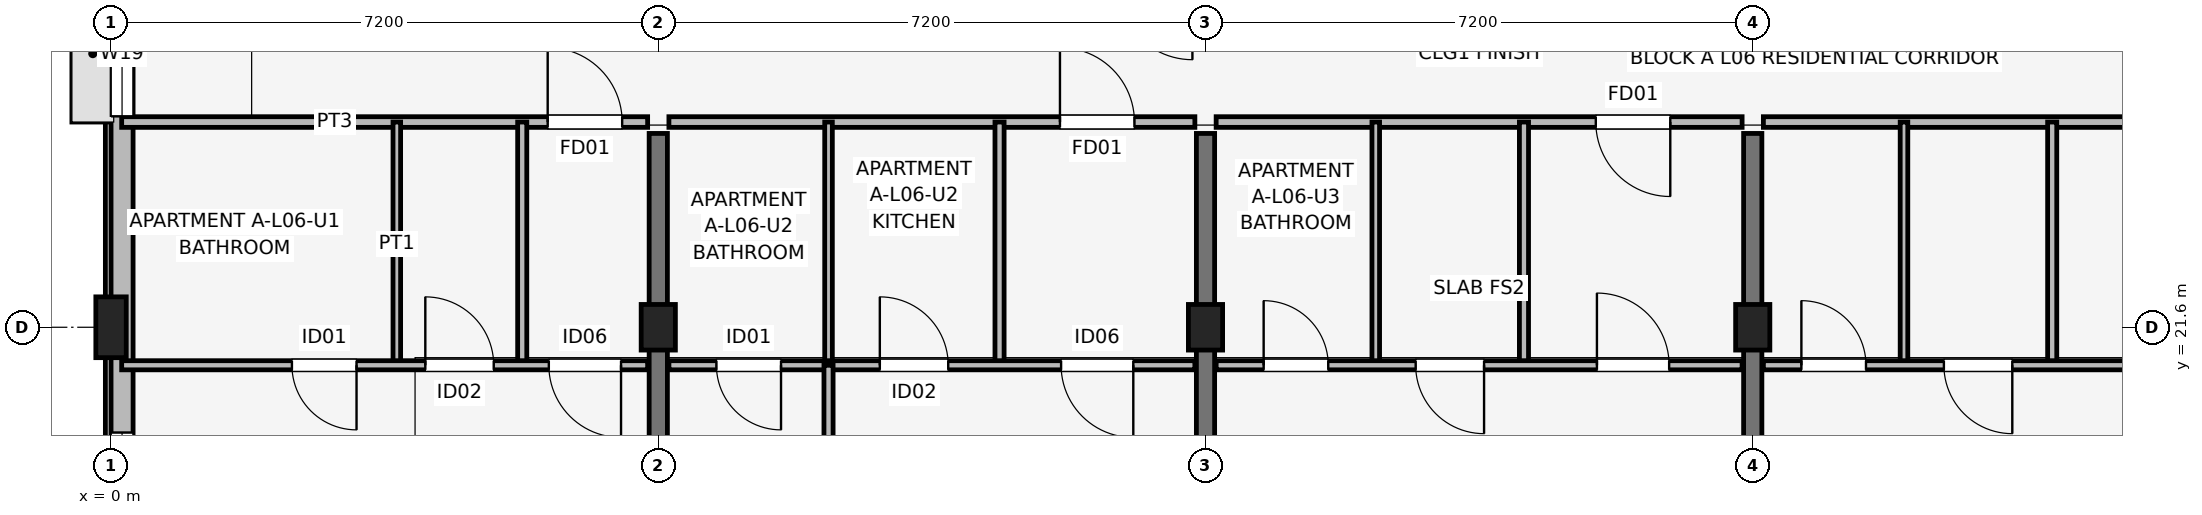
"""IFC4 building model, lengths in metres.
Left out: names, types, materials, properties, quantities, classifications, styles, units other than length and angle.
Written with IfcOpenShell. Run it as: python <this file> out.ifc"""

import sys

from ifc_helpers import new_model, si_unit, direction, frame, frame_2d, origin, origin_2d, place, context, subcontext, project, spatial, rectangle, extrude, element, fill, save


model = new_model("IFC4")
c1 = context("Model", 3, precision=1e-05, world=origin(), true_north=direction((0.0, 1.0)))
c2 = subcontext(c1, "Body", "Model", "MODEL_VIEW")
j1 = project(units=[si_unit("LENGTHUNIT", "METRE"), si_unit("PLANEANGLEUNIT", "RADIAN")], contexts=[c1])
p1 = place(None, origin())
s1 = spatial("IfcSite", under=j1, at=p1, CompositionType="ELEMENT")
p2 = place(p1, origin())
s2 = spatial("IfcBuilding", under=s1, at=p2, CompositionType="ELEMENT")
p3 = place(p2, frame((0.0, 0.0, 21.3)))
s3 = spatial("IfcBuildingStorey", under=s2, at=p3, CompositionType="ELEMENT", Elevation=21.3)
p4 = place(p3, frame((0.0, 21.6, 0.0), z_axis=(0.0, 0.0, 1.0), x_axis=(1.0, 0.0, 0.0)))
e1 = element("IfcColumn", 1, at=p4, inside=s3, PredefinedType="COLUMN", context=c2, shape_type="SweptSolid", body=[
    extrude(rectangle(XDim=0.4, YDim=0.8, at=origin_2d()), origin(), (0.0, 0.0, 1.0), 3.15),
])
for number, where, z_axis, x_axis in (
    (2, (7.2, 21.6, 0.0), (0.0, 0.0, 1.0), (1.0, 0.0, 0.0)),
    (3, (14.4, 21.6, 0.0), (0.0, 0.0, 1.0), (1.0, 0.0, 0.0)),
    (4, (21.6, 21.6, 0.0), (0.0, 0.0, 1.0), (1.0, 0.0, 0.0)),
):
    element("IfcColumn", number, at=place(p3, frame(where, z_axis=z_axis, x_axis=x_axis)), inside=s3, PredefinedType="COLUMN", context=c2, shape_type="SweptSolid", body=[
        extrude(rectangle(XDim=0.45, YDim=0.6, at=origin_2d()), origin(), (0.0, 0.0, 1.0), 3.15),
    ])
for number, where, z_axis, x_axis in (
    (5, (7.2, 14.75, 0.0), (0.0, 0.0, 1.0), (0.0, 1.0, 0.0)),
    (6, (14.4, 14.75, 0.0), (0.0, 0.0, 1.0), (0.0, 1.0, 0.0)),
    (7, (21.6, 14.75, 0.0), (0.0, 0.0, 1.0), (0.0, 1.0, 0.0)),
):
    element("IfcWall", number, at=place(p3, frame(where, z_axis=z_axis, x_axis=x_axis)), inside=s3, PredefinedType="SHEAR", context=c2, shape_type="SweptSolid", body=[
        extrude(rectangle(XDim=9.4, YDim=0.24, at=frame_2d((4.7, 0.0))), origin(), (0.0, 0.0, 1.0), 3.15),
    ])
p5 = place(p3, frame((0.145, 32.6, 0.0), z_axis=(0.0, 0.0, 1.0), x_axis=(0.0, -1.0, 0.0)))
e8 = element("IfcWall", 8, at=p5, inside=s3, PredefinedType="SOLIDWALL", context=c2, shape_type="SweptSolid", body=[
    extrude(rectangle(XDim=14.8, YDim=0.29, at=frame_2d((7.4, 0.0))), origin(), (0.0, 0.0, 1.0), 2.43),
])
p6 = place(p5, frame((6.575, 0.0, 1.05)))
e9 = element("IfcOpeningElement", 9, at=p6, cuts=e8, PredefinedType="OPENING", context=c2, shape_type="SweptSolid", body=[
    extrude(rectangle(XDim=1.65, YDim=1.15, at=frame_2d((0.825, 0.575))), frame((0.0, 0.155, 0.0), z_axis=(0.0, -1.0, 0.0), x_axis=(1.0, 0.0, 0.0)), (0.0, 0.0, 1.0), 0.31),
])
p7 = place(p5, frame((12.385, 0.0, 0.75)))
e10 = element("IfcOpeningElement", 10, at=p7, cuts=e8, PredefinedType="OPENING", context=c2, shape_type="SweptSolid", body=[
    extrude(rectangle(XDim=1.3, YDim=1.55, at=frame_2d((0.65, 0.775))), frame((0.0, 0.155, 0.0), z_axis=(0.0, -1.0, 0.0), x_axis=(1.0, 0.0, 0.0)), (0.0, 0.0, 1.0), 0.31),
])
p8 = place(p3, frame((0.14, 24.3, 0.0), z_axis=(0.0, 0.0, 1.0), x_axis=(1.0, 0.0, 0.0)))
e11 = element("IfcWall", 11, at=p8, inside=s3, PredefinedType="PARTITIONING", context=c2, shape_type="SweptSolid", body=[
    extrude(rectangle(XDim=6.92, YDim=0.14, at=frame_2d((3.46, 0.0))), origin(), (0.0, 0.0, 1.0), 2.38),
])
p9 = place(p8, frame((5.605, 0.0, 0.0)))
e12 = element("IfcOpeningElement", 12, at=p9, cuts=e11, PredefinedType="OPENING", context=c2, shape_type="SweptSolid", body=[
    extrude(rectangle(XDim=0.98, YDim=2.1, at=frame_2d((0.49, 1.05))), frame((0.0, 0.08, 0.0), z_axis=(0.0, -1.0, 0.0), x_axis=(1.0, 0.0, 0.0)), (0.0, 0.0, 1.0), 0.16),
])
p10 = place(p3, frame((3.76, 21.1, 0.0), z_axis=(0.0, 0.0, 1.0), x_axis=(0.0, 1.0, 0.0)))
e13 = element("IfcWall", 13, at=p10, inside=s3, PredefinedType="PARTITIONING", context=c2, shape_type="SweptSolid", body=[
    extrude(rectangle(XDim=3.2, YDim=0.1, at=frame_2d((1.6, 0.0))), origin(), (0.0, 0.0, 1.0), 2.38),
])
p11 = place(p3, frame((5.41, 21.1, 0.0), z_axis=(0.0, 0.0, 1.0), x_axis=(0.0, 1.0, 0.0)))
e14 = element("IfcWall", 14, at=p11, inside=s3, PredefinedType="PARTITIONING", context=c2, shape_type="SweptSolid", body=[
    extrude(rectangle(XDim=3.2, YDim=0.12, at=frame_2d((1.6, 0.0))), origin(), (0.0, 0.0, 1.0), 2.38),
])
p12 = place(p3, frame((0.14, 21.1, 0.0), z_axis=(0.0, 0.0, 1.0), x_axis=(1.0, 0.0, 0.0)))
e15 = element("IfcWall", 15, at=p12, inside=s3, PredefinedType="PARTITIONING", context=c2, shape_type="SweptSolid", body=[
    extrude(rectangle(XDim=6.92, YDim=0.12, at=frame_2d((3.46, 0.0))), origin(), (0.0, 0.0, 1.0), 2.38),
])
p13 = place(p12, frame((3.09, 0.0, 0.0), z_axis=(0.0, 0.0, 1.0), x_axis=(-1.0, 0.0, 0.0)))
e16 = element("IfcOpeningElement", 16, at=p13, cuts=e15, PredefinedType="OPENING", context=c2, shape_type="SweptSolid", body=[
    extrude(rectangle(XDim=0.85, YDim=2.08, at=frame_2d((0.425, 1.04))), frame((0.0, 0.07, 0.0), z_axis=(0.0, -1.0, 0.0), x_axis=(1.0, 0.0, 0.0)), (0.0, 0.0, 1.0), 0.14),
])
p14 = place(p12, frame((3.995, 0.0, 0.0)))
e17 = element("IfcOpeningElement", 17, at=p14, cuts=e15, PredefinedType="OPENING", context=c2, shape_type="SweptSolid", body=[
    extrude(rectangle(XDim=0.9, YDim=2.08, at=frame_2d((0.45, 1.04))), frame((0.0, 0.07, 0.0), z_axis=(0.0, -1.0, 0.0), x_axis=(1.0, 0.0, 0.0)), (0.0, 0.0, 1.0), 0.14),
])
p15 = place(p12, frame((6.57, 0.0, 0.0), z_axis=(0.0, 0.0, 1.0), x_axis=(-1.0, 0.0, 0.0)))
e18 = element("IfcOpeningElement", 18, at=p15, cuts=e15, PredefinedType="OPENING", context=c2, shape_type="SweptSolid", body=[
    extrude(rectangle(XDim=0.95, YDim=2.08, at=frame_2d((0.475, 1.04))), frame((0.0, 0.07, 0.0), z_axis=(0.0, -1.0, 0.0), x_axis=(1.0, 0.0, 0.0)), (0.0, 0.0, 1.0), 0.14),
])
p16 = place(p3, frame((7.34, 24.3, 0.0), z_axis=(0.0, 0.0, 1.0), x_axis=(1.0, 0.0, 0.0)))
e19 = element("IfcWall", 19, at=p16, inside=s3, PredefinedType="PARTITIONING", context=c2, shape_type="SweptSolid", body=[
    extrude(rectangle(XDim=6.92, YDim=0.14, at=frame_2d((3.46, 0.0))), origin(), (0.0, 0.0, 1.0), 2.38),
])
p17 = place(p16, frame((5.145, 0.0, 0.0)))
e20 = element("IfcOpeningElement", 20, at=p17, cuts=e19, PredefinedType="OPENING", context=c2, shape_type="SweptSolid", body=[
    extrude(rectangle(XDim=0.98, YDim=2.1, at=frame_2d((0.49, 1.05))), frame((0.0, 0.08, 0.0), z_axis=(0.0, -1.0, 0.0), x_axis=(1.0, 0.0, 0.0)), (0.0, 0.0, 1.0), 0.16),
])
p18 = place(p3, frame((9.44, 21.1, 0.0), z_axis=(0.0, 0.0, 1.0), x_axis=(0.0, 1.0, 0.0)))
e21 = element("IfcWall", 21, at=p18, inside=s3, PredefinedType="PARTITIONING", context=c2, shape_type="SweptSolid", body=[
    extrude(rectangle(XDim=3.2, YDim=0.1, at=frame_2d((1.6, 0.0))), origin(), (0.0, 0.0, 1.0), 2.38),
])
p19 = place(p3, frame((11.69, 21.1, 0.0), z_axis=(0.0, 0.0, 1.0), x_axis=(0.0, 1.0, 0.0)))
e22 = element("IfcWall", 22, at=p19, inside=s3, PredefinedType="PARTITIONING", context=c2, shape_type="SweptSolid", body=[
    extrude(rectangle(XDim=3.2, YDim=0.12, at=frame_2d((1.6, 0.0))), origin(), (0.0, 0.0, 1.0), 2.38),
])
p20 = place(p3, frame((7.34, 21.1, 0.0), z_axis=(0.0, 0.0, 1.0), x_axis=(1.0, 0.0, 0.0)))
e23 = element("IfcWall", 23, at=p20, inside=s3, PredefinedType="PARTITIONING", context=c2, shape_type="SweptSolid", body=[
    extrude(rectangle(XDim=6.92, YDim=0.12, at=frame_2d((3.46, 0.0))), origin(), (0.0, 0.0, 1.0), 2.38),
])
p21 = place(p20, frame((1.475, 0.0, 0.0), z_axis=(0.0, 0.0, 1.0), x_axis=(-1.0, 0.0, 0.0)))
e24 = element("IfcOpeningElement", 24, at=p21, cuts=e23, PredefinedType="OPENING", context=c2, shape_type="SweptSolid", body=[
    extrude(rectangle(XDim=0.85, YDim=2.08, at=frame_2d((0.425, 1.04))), frame((0.0, 0.07, 0.0), z_axis=(0.0, -1.0, 0.0), x_axis=(1.0, 0.0, 0.0)), (0.0, 0.0, 1.0), 0.14),
])
p22 = place(p20, frame((2.775, 0.0, 0.0)))
e25 = element("IfcOpeningElement", 25, at=p22, cuts=e23, PredefinedType="OPENING", context=c2, shape_type="SweptSolid", body=[
    extrude(rectangle(XDim=0.9, YDim=2.08, at=frame_2d((0.45, 1.04))), frame((0.0, 0.07, 0.0), z_axis=(0.0, -1.0, 0.0), x_axis=(1.0, 0.0, 0.0)), (0.0, 0.0, 1.0), 0.14),
])
p23 = place(p20, frame((6.11, 0.0, 0.0), z_axis=(0.0, 0.0, 1.0), x_axis=(-1.0, 0.0, 0.0)))
e26 = element("IfcOpeningElement", 26, at=p23, cuts=e23, PredefinedType="OPENING", context=c2, shape_type="SweptSolid", body=[
    extrude(rectangle(XDim=0.95, YDim=2.08, at=frame_2d((0.475, 1.04))), frame((0.0, 0.07, 0.0), z_axis=(0.0, -1.0, 0.0), x_axis=(1.0, 0.0, 0.0)), (0.0, 0.0, 1.0), 0.14),
])
p24 = place(p3, frame((9.44, 14.7, 0.0), z_axis=(0.0, 0.0, 1.0), x_axis=(0.0, 1.0, 0.0)))
e27 = element("IfcWall", 27, at=p24, inside=s3, PredefinedType="PARTITIONING", context=c2, shape_type="SweptSolid", body=[
    extrude(rectangle(XDim=6.4, YDim=0.12, at=frame_2d((3.2, 0.0))), origin(), (0.0, 0.0, 1.0), 2.38),
])
p25 = place(p24, frame((2.75, 0.0, 0.0)))
e28 = element("IfcOpeningElement", 28, at=p25, cuts=e27, PredefinedType="OPENING", context=c2, shape_type="SweptSolid", body=[
    extrude(rectangle(XDim=0.9, YDim=2.08, at=frame_2d((0.45, 1.04))), frame((0.0, 0.07, 0.0), z_axis=(0.0, -1.0, 0.0), x_axis=(1.0, 0.0, 0.0)), (0.0, 0.0, 1.0), 0.14),
])
p26 = place(p3, frame((14.54, 24.3, 0.0), z_axis=(0.0, 0.0, 1.0), x_axis=(1.0, 0.0, 0.0)))
e29 = element("IfcWall", 29, at=p26, inside=s3, PredefinedType="PARTITIONING", context=c2, shape_type="SweptSolid", body=[
    extrude(rectangle(XDim=6.92, YDim=0.14, at=frame_2d((3.46, 0.0))), origin(), (0.0, 0.0, 1.0), 2.38),
])
p27 = place(p26, frame((5.975, 0.0, 0.0), z_axis=(0.0, 0.0, 1.0), x_axis=(-1.0, 0.0, 0.0)))
e30 = element("IfcOpeningElement", 30, at=p27, cuts=e29, PredefinedType="OPENING", context=c2, shape_type="SweptSolid", body=[
    extrude(rectangle(XDim=0.98, YDim=2.1, at=frame_2d((0.49, 1.05))), frame((0.0, 0.08, 0.0), z_axis=(0.0, -1.0, 0.0), x_axis=(1.0, 0.0, 0.0)), (0.0, 0.0, 1.0), 0.16),
])
p28 = place(p3, frame((16.64, 21.1, 0.0), z_axis=(0.0, 0.0, 1.0), x_axis=(0.0, 1.0, 0.0)))
e31 = element("IfcWall", 31, at=p28, inside=s3, PredefinedType="PARTITIONING", context=c2, shape_type="SweptSolid", body=[
    extrude(rectangle(XDim=3.2, YDim=0.1, at=frame_2d((1.6, 0.0))), origin(), (0.0, 0.0, 1.0), 2.38),
])
p29 = place(p3, frame((18.59, 21.1, 0.0), z_axis=(0.0, 0.0, 1.0), x_axis=(0.0, 1.0, 0.0)))
e32 = element("IfcWall", 32, at=p29, inside=s3, PredefinedType="PARTITIONING", context=c2, shape_type="SweptSolid", body=[
    extrude(rectangle(XDim=3.2, YDim=0.12, at=frame_2d((1.6, 0.0))), origin(), (0.0, 0.0, 1.0), 2.38),
])
p30 = place(p3, frame((14.54, 21.1, 0.0), z_axis=(0.0, 0.0, 1.0), x_axis=(1.0, 0.0, 0.0)))
e33 = element("IfcWall", 33, at=p30, inside=s3, PredefinedType="PARTITIONING", context=c2, shape_type="SweptSolid", body=[
    extrude(rectangle(XDim=6.92, YDim=0.12, at=frame_2d((3.46, 0.0))), origin(), (0.0, 0.0, 1.0), 2.38),
])
p31 = place(p30, frame((0.625, 0.0, 0.0)))
e34 = element("IfcOpeningElement", 34, at=p31, cuts=e33, PredefinedType="OPENING", context=c2, shape_type="SweptSolid", body=[
    extrude(rectangle(XDim=0.85, YDim=2.08, at=frame_2d((0.425, 1.04))), frame((0.0, 0.07, 0.0), z_axis=(0.0, -1.0, 0.0), x_axis=(1.0, 0.0, 0.0)), (0.0, 0.0, 1.0), 0.14),
])
p32 = place(p30, frame((3.525, 0.0, 0.0), z_axis=(0.0, 0.0, 1.0), x_axis=(-1.0, 0.0, 0.0)))
e35 = element("IfcOpeningElement", 35, at=p32, cuts=e33, PredefinedType="OPENING", context=c2, shape_type="SweptSolid", body=[
    extrude(rectangle(XDim=0.9, YDim=2.08, at=frame_2d((0.45, 1.04))), frame((0.0, 0.07, 0.0), z_axis=(0.0, -1.0, 0.0), x_axis=(1.0, 0.0, 0.0)), (0.0, 0.0, 1.0), 0.14),
])
p33 = place(p30, frame((5.01, 0.0, 0.0)))
e36 = element("IfcOpeningElement", 36, at=p33, cuts=e33, PredefinedType="OPENING", context=c2, shape_type="SweptSolid", body=[
    extrude(rectangle(XDim=0.95, YDim=2.08, at=frame_2d((0.475, 1.04))), frame((0.0, 0.07, 0.0), z_axis=(0.0, -1.0, 0.0), x_axis=(1.0, 0.0, 0.0)), (0.0, 0.0, 1.0), 0.14),
])
p34 = place(p3, frame((21.74, 24.3, 0.0), z_axis=(0.0, 0.0, 1.0), x_axis=(1.0, 0.0, 0.0)))
e37 = element("IfcWall", 37, at=p34, inside=s3, PredefinedType="PARTITIONING", context=c2, shape_type="SweptSolid", body=[
    extrude(rectangle(XDim=6.92, YDim=0.14, at=frame_2d((3.46, 0.0))), origin(), (0.0, 0.0, 1.0), 2.38),
])
p35 = place(p34, frame((5.85, 0.0, 0.0), z_axis=(0.0, 0.0, 1.0), x_axis=(-1.0, 0.0, 0.0)))
e38 = element("IfcOpeningElement", 38, at=p35, cuts=e37, PredefinedType="OPENING", context=c2, shape_type="SweptSolid", body=[
    extrude(rectangle(XDim=0.98, YDim=2.1, at=frame_2d((0.49, 1.05))), frame((0.0, 0.08, 0.0), z_axis=(0.0, -1.0, 0.0), x_axis=(1.0, 0.0, 0.0)), (0.0, 0.0, 1.0), 0.16),
])
p36 = place(p3, frame((23.59, 21.1, 0.0), z_axis=(0.0, 0.0, 1.0), x_axis=(0.0, 1.0, 0.0)))
e39 = element("IfcWall", 39, at=p36, inside=s3, PredefinedType="PARTITIONING", context=c2, shape_type="SweptSolid", body=[
    extrude(rectangle(XDim=3.2, YDim=0.1, at=frame_2d((1.6, 0.0))), origin(), (0.0, 0.0, 1.0), 2.38),
])
p37 = place(p3, frame((25.54, 21.1, 0.0), z_axis=(0.0, 0.0, 1.0), x_axis=(0.0, 1.0, 0.0)))
e40 = element("IfcWall", 40, at=p37, inside=s3, PredefinedType="PARTITIONING", context=c2, shape_type="SweptSolid", body=[
    extrude(rectangle(XDim=3.2, YDim=0.12, at=frame_2d((1.6, 0.0))), origin(), (0.0, 0.0, 1.0), 2.38),
])
p38 = place(p3, frame((21.74, 21.1, 0.0), z_axis=(0.0, 0.0, 1.0), x_axis=(1.0, 0.0, 0.0)))
e41 = element("IfcWall", 41, at=p38, inside=s3, PredefinedType="PARTITIONING", context=c2, shape_type="SweptSolid", body=[
    extrude(rectangle(XDim=6.92, YDim=0.12, at=frame_2d((3.46, 0.0))), origin(), (0.0, 0.0, 1.0), 2.38),
])
p39 = place(p38, frame((0.5, 0.0, 0.0)))
e42 = element("IfcOpeningElement", 42, at=p39, cuts=e41, PredefinedType="OPENING", context=c2, shape_type="SweptSolid", body=[
    extrude(rectangle(XDim=0.85, YDim=2.08, at=frame_2d((0.425, 1.04))), frame((0.0, 0.07, 0.0), z_axis=(0.0, -1.0, 0.0), x_axis=(1.0, 0.0, 0.0)), (0.0, 0.0, 1.0), 0.14),
])
p40 = place(p38, frame((3.275, 0.0, 0.0), z_axis=(0.0, 0.0, 1.0), x_axis=(-1.0, 0.0, 0.0)))
e43 = element("IfcOpeningElement", 43, at=p40, cuts=e41, PredefinedType="OPENING", context=c2, shape_type="SweptSolid", body=[
    extrude(rectangle(XDim=0.9, YDim=2.08, at=frame_2d((0.45, 1.04))), frame((0.0, 0.07, 0.0), z_axis=(0.0, -1.0, 0.0), x_axis=(1.0, 0.0, 0.0)), (0.0, 0.0, 1.0), 0.14),
])
p41 = place(p38, frame((4.885, 0.0, 0.0)))
e44 = element("IfcOpeningElement", 44, at=p41, cuts=e41, PredefinedType="OPENING", context=c2, shape_type="SweptSolid", body=[
    extrude(rectangle(XDim=0.95, YDim=2.08, at=frame_2d((0.475, 1.04))), frame((0.0, 0.07, 0.0), z_axis=(0.0, -1.0, 0.0), x_axis=(1.0, 0.0, 0.0)), (0.0, 0.0, 1.0), 0.14),
])
p42 = place(p6, origin())
e45 = element("IfcWindow", 45, at=p42, inside=s3, PartitioningType="SINGLE_PANEL", PredefinedType="WINDOW", context=c2, shape_type="SweptSolid", body=[
    extrude(rectangle(XDim=1.65, YDim=1.15, at=frame_2d((0.825, 0.575))), frame((0.0, 0.03, 0.0), z_axis=(0.0, -1.0, 0.0), x_axis=(1.0, 0.0, 0.0)), (0.0, 0.0, 1.0), 0.06),
])
fill(e9, e45)
p43 = place(p7, origin())
e46 = element("IfcWindow", 46, at=p43, inside=s3, PartitioningType="SINGLE_PANEL", PredefinedType="WINDOW", context=c2, shape_type="SweptSolid", body=[
    extrude(rectangle(XDim=1.3, YDim=1.55, at=frame_2d((0.65, 0.775))), frame((0.0, 0.03, 0.0), z_axis=(0.0, -1.0, 0.0), x_axis=(1.0, 0.0, 0.0)), (0.0, 0.0, 1.0), 0.06),
])
fill(e10, e46)
p44 = place(p9, origin())
e47 = element("IfcDoor", 47, at=p44, inside=s3, OperationType="SINGLE_SWING_LEFT", PredefinedType="DOOR", context=c2, shape_type="SweptSolid", body=[
    extrude(rectangle(XDim=0.98, YDim=2.1, at=frame_2d((0.49, 1.05))), frame((0.0, 0.025, 0.0), z_axis=(0.0, -1.0, 0.0), x_axis=(1.0, 0.0, 0.0)), (0.0, 0.0, 1.0), 0.05),
])
fill(e12, e47)
p45 = place(p13, origin())
e48 = element("IfcDoor", 48, at=p45, inside=s3, OperationType="SINGLE_SWING_RIGHT", PredefinedType="DOOR", context=c2, shape_type="SweptSolid", body=[
    extrude(rectangle(XDim=0.85, YDim=2.08, at=frame_2d((0.425, 1.04))), frame((0.0, 0.025, 0.0), z_axis=(0.0, -1.0, 0.0), x_axis=(1.0, 0.0, 0.0)), (0.0, 0.0, 1.0), 0.05),
])
fill(e16, e48)
p46 = place(p14, origin())
e49 = element("IfcDoor", 49, at=p46, inside=s3, OperationType="SINGLE_SWING_LEFT", PredefinedType="DOOR", context=c2, shape_type="SweptSolid", body=[
    extrude(rectangle(XDim=0.9, YDim=2.08, at=frame_2d((0.45, 1.04))), frame((0.0, 0.025, 0.0), z_axis=(0.0, -1.0, 0.0), x_axis=(1.0, 0.0, 0.0)), (0.0, 0.0, 1.0), 0.05),
])
fill(e17, e49)
p47 = place(p15, origin())
e50 = element("IfcDoor", 50, at=p47, inside=s3, OperationType="SINGLE_SWING_RIGHT", PredefinedType="DOOR", context=c2, shape_type="SweptSolid", body=[
    extrude(rectangle(XDim=0.95, YDim=2.08, at=frame_2d((0.475, 1.04))), frame((0.0, 0.025, 0.0), z_axis=(0.0, -1.0, 0.0), x_axis=(1.0, 0.0, 0.0)), (0.0, 0.0, 1.0), 0.05),
])
fill(e18, e50)
p48 = place(p17, origin())
e51 = element("IfcDoor", 51, at=p48, inside=s3, OperationType="SINGLE_SWING_LEFT", PredefinedType="DOOR", context=c2, shape_type="SweptSolid", body=[
    extrude(rectangle(XDim=0.98, YDim=2.1, at=frame_2d((0.49, 1.05))), frame((0.0, 0.025, 0.0), z_axis=(0.0, -1.0, 0.0), x_axis=(1.0, 0.0, 0.0)), (0.0, 0.0, 1.0), 0.05),
])
fill(e20, e51)
p49 = place(p21, origin())
e52 = element("IfcDoor", 52, at=p49, inside=s3, OperationType="SINGLE_SWING_RIGHT", PredefinedType="DOOR", context=c2, shape_type="SweptSolid", body=[
    extrude(rectangle(XDim=0.85, YDim=2.08, at=frame_2d((0.425, 1.04))), frame((0.0, 0.025, 0.0), z_axis=(0.0, -1.0, 0.0), x_axis=(1.0, 0.0, 0.0)), (0.0, 0.0, 1.0), 0.05),
])
fill(e24, e52)
p50 = place(p22, origin())
e53 = element("IfcDoor", 53, at=p50, inside=s3, OperationType="SINGLE_SWING_LEFT", PredefinedType="DOOR", context=c2, shape_type="SweptSolid", body=[
    extrude(rectangle(XDim=0.9, YDim=2.08, at=frame_2d((0.45, 1.04))), frame((0.0, 0.025, 0.0), z_axis=(0.0, -1.0, 0.0), x_axis=(1.0, 0.0, 0.0)), (0.0, 0.0, 1.0), 0.05),
])
fill(e25, e53)
p51 = place(p23, origin())
e54 = element("IfcDoor", 54, at=p51, inside=s3, OperationType="SINGLE_SWING_RIGHT", PredefinedType="DOOR", context=c2, shape_type="SweptSolid", body=[
    extrude(rectangle(XDim=0.95, YDim=2.08, at=frame_2d((0.475, 1.04))), frame((0.0, 0.025, 0.0), z_axis=(0.0, -1.0, 0.0), x_axis=(1.0, 0.0, 0.0)), (0.0, 0.0, 1.0), 0.05),
])
fill(e26, e54)
p52 = place(p27, origin())
e55 = element("IfcDoor", 55, at=p52, inside=s3, OperationType="SINGLE_SWING_RIGHT", PredefinedType="DOOR", context=c2, shape_type="SweptSolid", body=[
    extrude(rectangle(XDim=0.98, YDim=2.1, at=frame_2d((0.49, 1.05))), frame((0.0, 0.025, 0.0), z_axis=(0.0, -1.0, 0.0), x_axis=(1.0, 0.0, 0.0)), (0.0, 0.0, 1.0), 0.05),
])
fill(e30, e55)
p53 = place(p31, origin())
e56 = element("IfcDoor", 56, at=p53, inside=s3, OperationType="SINGLE_SWING_LEFT", PredefinedType="DOOR", context=c2, shape_type="SweptSolid", body=[
    extrude(rectangle(XDim=0.85, YDim=2.08, at=frame_2d((0.425, 1.04))), frame((0.0, 0.025, 0.0), z_axis=(0.0, -1.0, 0.0), x_axis=(1.0, 0.0, 0.0)), (0.0, 0.0, 1.0), 0.05),
])
fill(e34, e56)
p54 = place(p32, origin())
e57 = element("IfcDoor", 57, at=p54, inside=s3, OperationType="SINGLE_SWING_RIGHT", PredefinedType="DOOR", context=c2, shape_type="SweptSolid", body=[
    extrude(rectangle(XDim=0.9, YDim=2.08, at=frame_2d((0.45, 1.04))), frame((0.0, 0.025, 0.0), z_axis=(0.0, -1.0, 0.0), x_axis=(1.0, 0.0, 0.0)), (0.0, 0.0, 1.0), 0.05),
])
fill(e35, e57)
p55 = place(p33, origin())
e58 = element("IfcDoor", 58, at=p55, inside=s3, OperationType="SINGLE_SWING_LEFT", PredefinedType="DOOR", context=c2, shape_type="SweptSolid", body=[
    extrude(rectangle(XDim=0.95, YDim=2.08, at=frame_2d((0.475, 1.04))), frame((0.0, 0.025, 0.0), z_axis=(0.0, -1.0, 0.0), x_axis=(1.0, 0.0, 0.0)), (0.0, 0.0, 1.0), 0.05),
])
fill(e36, e58)
p56 = place(p39, origin())
e59 = element("IfcDoor", 59, at=p56, inside=s3, OperationType="SINGLE_SWING_LEFT", PredefinedType="DOOR", context=c2, shape_type="SweptSolid", body=[
    extrude(rectangle(XDim=0.85, YDim=2.08, at=frame_2d((0.425, 1.04))), frame((0.0, 0.025, 0.0), z_axis=(0.0, -1.0, 0.0), x_axis=(1.0, 0.0, 0.0)), (0.0, 0.0, 1.0), 0.05),
])
fill(e42, e59)
p57 = place(p40, origin())
e60 = element("IfcDoor", 60, at=p57, inside=s3, OperationType="SINGLE_SWING_RIGHT", PredefinedType="DOOR", context=c2, shape_type="SweptSolid", body=[
    extrude(rectangle(XDim=0.9, YDim=2.08, at=frame_2d((0.45, 1.04))), frame((0.0, 0.025, 0.0), z_axis=(0.0, -1.0, 0.0), x_axis=(1.0, 0.0, 0.0)), (0.0, 0.0, 1.0), 0.05),
])
fill(e43, e60)
save(model, sys.argv[1])
